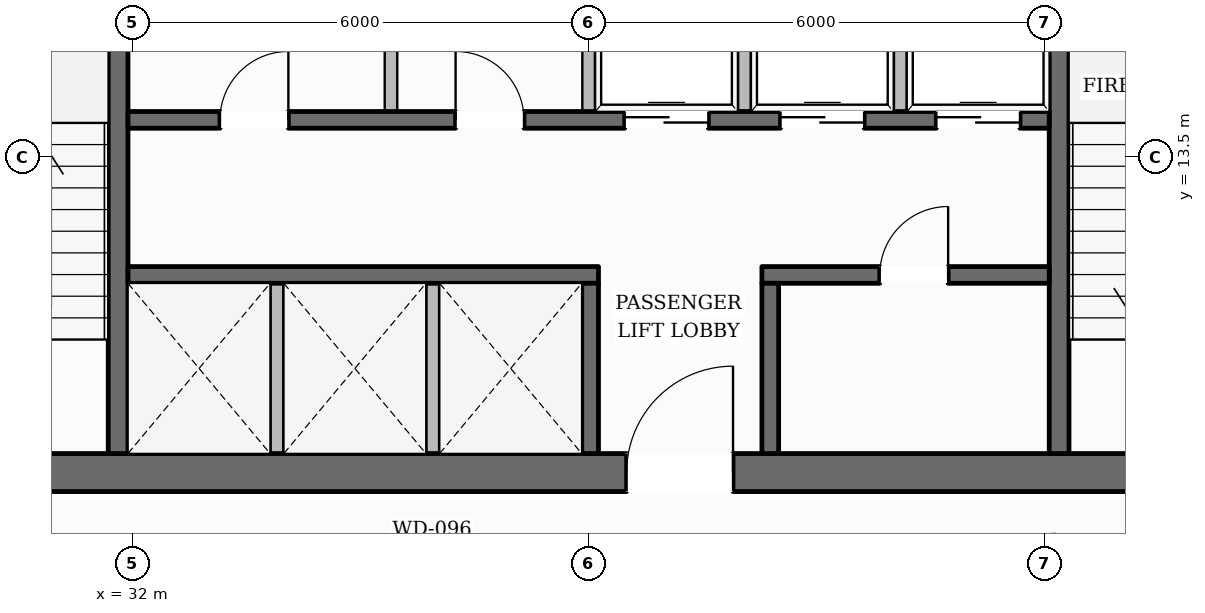
"""IFC4 building model, lengths in metres.
Left out: names, types, materials, properties, quantities, classifications, styles, units other than length and angle.
Written with IfcOpenShell. Run it as: python <this file> out.ifc"""

import sys

from ifc_helpers import new_model, si_unit, direction, frame, frame_2d, origin, place, context, subcontext, project, spatial, rectangle, extrude, element, fill, save


model = new_model("IFC4")
c1 = context("Model", 3, precision=1e-05, world=origin(), true_north=direction((0.0, 1.0)))
c2 = subcontext(c1, "Body", "Model", "MODEL_VIEW")
j1 = project(units=[si_unit("LENGTHUNIT", "METRE"), si_unit("PLANEANGLEUNIT", "RADIAN")], contexts=[c1])
p1 = place(None, origin())
s1 = spatial("IfcSite", under=j1, at=p1, CompositionType="ELEMENT")
p2 = place(p1, origin())
s2 = spatial("IfcBuilding", under=s1, at=p2, CompositionType="ELEMENT")
p3 = place(p2, frame((0.0, 0.0, 100.9)))
s3 = spatial("IfcBuildingStorey", under=s2, at=p3, CompositionType="ELEMENT", Elevation=100.9)
p4 = place(p3, frame((27.98, 9.35, 0.0), z_axis=(0.0, 0.0, 1.0), x_axis=(1.0, 0.0, 0.0)))
e1 = element("IfcWall", 1, at=p4, inside=s3, PredefinedType="SOLIDWALL", context=c2, shape_type="SweptSolid", body=[
    extrude(rectangle(XDim=20.04, YDim=0.5, at=frame_2d((10.02, 0.0))), origin(), (0.0, 0.0, 1.0), 3.6),
])
p5 = place(p4, frame((10.52, 0.0, 0.0)))
e2 = element("IfcOpeningElement", 2, at=p5, cuts=e1, PredefinedType="OPENING", context=c2, shape_type="SweptSolid", body=[
    extrude(rectangle(XDim=1.4, YDim=2.2, at=frame_2d((0.7, 1.1))), frame((0.0, 0.26, 0.0), z_axis=(0.0, -1.0, 0.0), x_axis=(1.0, 0.0, 0.0)), (0.0, 0.0, 1.0), 0.52),
])
p6 = place(p3, frame((31.81, 9.6, 0.0), z_axis=(0.0, 0.0, 1.0), x_axis=(0.0, 1.0, 0.0)))
e3 = element("IfcWall", 3, at=p6, inside=s3, PredefinedType="SHEAR", context=c2, shape_type="SweptSolid", body=[
    extrude(rectangle(XDim=13.0, YDim=0.26, at=frame_2d((6.5, 0.0))), origin(), (0.0, 0.0, 1.0), 3.6),
])
p7 = place(p6, frame((10.925, 0.0, 0.0)))
e4 = element("IfcOpeningElement", 4, at=p7, cuts=e3, PredefinedType="OPENING", context=c2, shape_type="SweptSolid", body=[
    extrude(rectangle(XDim=1.25, YDim=2.25, at=frame_2d((0.625, 1.125))), frame((0.0, 0.14, 0.0), z_axis=(0.0, -1.0, 0.0), x_axis=(1.0, 0.0, 0.0)), (0.0, 0.0, 1.0), 0.28),
])
p8 = place(p3, frame((44.19, 9.6, 0.0), z_axis=(0.0, 0.0, 1.0), x_axis=(0.0, 1.0, 0.0)))
e5 = element("IfcWall", 5, at=p8, inside=s3, PredefinedType="SHEAR", context=c2, shape_type="SweptSolid", body=[
    extrude(rectangle(XDim=13.0, YDim=0.26, at=frame_2d((6.5, 0.0))), origin(), (0.0, 0.0, 1.0), 3.6),
])
p9 = place(p8, frame((10.925, 0.0, 0.0)))
e6 = element("IfcOpeningElement", 6, at=p9, cuts=e5, PredefinedType="OPENING", context=c2, shape_type="SweptSolid", body=[
    extrude(rectangle(XDim=1.25, YDim=2.25, at=frame_2d((0.625, 1.125))), frame((0.0, 0.14, 0.0), z_axis=(0.0, -1.0, 0.0), x_axis=(1.0, 0.0, 0.0)), (0.0, 0.0, 1.0), 0.28),
])
p10 = place(p3, frame((31.94, 13.99, 0.0), z_axis=(0.0, 0.0, 1.0), x_axis=(1.0, 0.0, 0.0)))
e7 = element("IfcWall", 7, at=p10, inside=s3, PredefinedType="SOLIDWALL", context=c2, shape_type="SweptSolid", body=[
    extrude(rectangle(XDim=12.12, YDim=0.22, at=frame_2d((6.06, 0.0))), origin(), (0.0, 0.0, 1.0), 3.6),
])
p11 = place(p10, frame((1.21, 0.0, 0.0)))
e8 = element("IfcOpeningElement", 8, at=p11, cuts=e7, PredefinedType="OPENING", context=c2, shape_type="SweptSolid", body=[
    extrude(rectangle(XDim=0.9, YDim=2.1, at=frame_2d((0.45, 1.05))), frame((0.0, 0.12, 0.0), z_axis=(0.0, -1.0, 0.0), x_axis=(1.0, 0.0, 0.0)), (0.0, 0.0, 1.0), 0.24),
])
p12 = place(p10, frame((4.31, 0.0, 0.0)))
e9 = element("IfcOpeningElement", 9, at=p12, cuts=e7, PredefinedType="OPENING", context=c2, shape_type="SweptSolid", body=[
    extrude(rectangle(XDim=0.9, YDim=2.1, at=frame_2d((0.45, 1.05))), frame((0.0, 0.12, 0.0), z_axis=(0.0, -1.0, 0.0), x_axis=(1.0, 0.0, 0.0)), (0.0, 0.0, 1.0), 0.24),
])
p13 = place(p10, frame((6.535, 0.0, 0.0)))
e10 = element("IfcOpeningElement", 10, at=p13, cuts=e7, PredefinedType="OPENING", context=c2, shape_type="SweptSolid", body=[
    extrude(rectangle(XDim=1.1, YDim=2.2, at=frame_2d((0.55, 1.1))), frame((0.0, 0.12, 0.0), z_axis=(0.0, -1.0, 0.0), x_axis=(1.0, 0.0, 0.0)), (0.0, 0.0, 1.0), 0.24),
])
p14 = place(p10, frame((8.585, 0.0, 0.0)))
e11 = element("IfcOpeningElement", 11, at=p14, cuts=e7, PredefinedType="OPENING", context=c2, shape_type="SweptSolid", body=[
    extrude(rectangle(XDim=1.1, YDim=2.2, at=frame_2d((0.55, 1.1))), frame((0.0, 0.12, 0.0), z_axis=(0.0, -1.0, 0.0), x_axis=(1.0, 0.0, 0.0)), (0.0, 0.0, 1.0), 0.24),
])
p15 = place(p10, frame((10.635, 0.0, 0.0)))
e12 = element("IfcOpeningElement", 12, at=p15, cuts=e7, PredefinedType="OPENING", context=c2, shape_type="SweptSolid", body=[
    extrude(rectangle(XDim=1.1, YDim=2.2, at=frame_2d((0.55, 1.1))), frame((0.0, 0.12, 0.0), z_axis=(0.0, -1.0, 0.0), x_axis=(1.0, 0.0, 0.0)), (0.0, 0.0, 1.0), 0.24),
])
p16 = place(p3, frame((31.94, 11.95, 0.0), z_axis=(0.0, 0.0, 1.0), x_axis=(1.0, 0.0, 0.0)))
e13 = element("IfcWall", 13, at=p16, inside=s3, PredefinedType="SOLIDWALL", context=c2, shape_type="SweptSolid", body=[
    extrude(rectangle(XDim=6.19, YDim=0.22, at=frame_2d((3.095, 0.0))), origin(), (0.0, 0.0, 1.0), 3.6),
])
p17 = place(p3, frame((40.28, 11.95, 0.0), z_axis=(0.0, 0.0, 1.0), x_axis=(1.0, 0.0, 0.0)))
e14 = element("IfcWall", 14, at=p17, inside=s3, PredefinedType="SOLIDWALL", context=c2, shape_type="SweptSolid", body=[
    extrude(rectangle(XDim=3.78, YDim=0.22, at=frame_2d((1.89, 0.0))), origin(), (0.0, 0.0, 1.0), 3.6),
])
p18 = place(p17, frame((1.55, 0.0, 0.0)))
e15 = element("IfcOpeningElement", 15, at=p18, cuts=e14, PredefinedType="OPENING", context=c2, shape_type="SweptSolid", body=[
    extrude(rectangle(XDim=0.9, YDim=2.1, at=frame_2d((0.45, 1.05))), frame((0.0, 0.12, 0.0), z_axis=(0.0, -1.0, 0.0), x_axis=(1.0, 0.0, 0.0)), (0.0, 0.0, 1.0), 0.24),
])
for number, where, z_axis, x_axis in (
    (16, (38.02, 9.6, 0.0), (0.0, 0.0, 1.0), (0.0, 1.0, 0.0)),
    (17, (40.39, 9.6, 0.0), (0.0, 0.0, 1.0), (0.0, 1.0, 0.0)),
):
    element("IfcWall", number, at=place(p3, frame(where, z_axis=z_axis, x_axis=x_axis)), inside=s3, PredefinedType="SOLIDWALL", context=c2, shape_type="SweptSolid", body=[
        extrude(rectangle(XDim=2.24, YDim=0.22, at=frame_2d((1.12, 0.0))), origin(), (0.0, 0.0, 1.0), 3.6),
    ])
p19 = place(p3, frame((14.155, 13.347, 0.0), z_axis=(0.0, 0.0, 1.0), x_axis=(0.493868426836, 0.869536644986, 0.0)))
e18 = element("IfcWall", 18, at=p19, inside=s3, PredefinedType="STANDARD", context=c2, shape_type="SweptSolid", body=[
    extrude(rectangle(XDim=36.121, YDim=0.38, at=frame_2d((18.061, 0.0))), origin(), (0.0, 0.0, 1.0), 3.059),
])
p20 = place(p19, frame((31.935, 0.0, 0.65)))
e19 = element("IfcOpeningElement", 19, at=p20, cuts=e18, PredefinedType="OPENING", context=c2, shape_type="SweptSolid", body=[
    extrude(rectangle(XDim=1.55, YDim=1.75, at=frame_2d((0.775, 0.875))), frame((0.0, 0.2, 0.0), z_axis=(0.0, -1.0, 0.0), x_axis=(1.0, 0.0, 0.0)), (0.0, 0.0, 1.0), 0.4),
])
p21 = place(p19, frame((26.073, 0.0, 0.65)))
e20 = element("IfcOpeningElement", 20, at=p21, cuts=e18, PredefinedType="OPENING", context=c2, shape_type="SweptSolid", body=[
    extrude(rectangle(XDim=1.55, YDim=1.75, at=frame_2d((0.775, 0.875))), frame((0.0, 0.2, 0.0), z_axis=(0.0, -1.0, 0.0), x_axis=(1.0, 0.0, 0.0)), (0.0, 0.0, 1.0), 0.4),
])
p22 = place(p19, frame((14.352, 0.0, 0.65)))
e21 = element("IfcOpeningElement", 21, at=p22, cuts=e18, PredefinedType="OPENING", context=c2, shape_type="SweptSolid", body=[
    extrude(rectangle(XDim=1.55, YDim=1.75, at=frame_2d((0.775, 0.875))), frame((0.0, 0.2, 0.0), z_axis=(0.0, -1.0, 0.0), x_axis=(1.0, 0.0, 0.0)), (0.0, 0.0, 1.0), 0.4),
])
p23 = place(p19, frame((8.491, 0.0, 0.65)))
e22 = element("IfcOpeningElement", 22, at=p23, cuts=e18, PredefinedType="OPENING", context=c2, shape_type="SweptSolid", body=[
    extrude(rectangle(XDim=1.55, YDim=1.75, at=frame_2d((0.775, 0.875))), frame((0.0, 0.2, 0.0), z_axis=(0.0, -1.0, 0.0), x_axis=(1.0, 0.0, 0.0)), (0.0, 0.0, 1.0), 0.4),
])
p24 = place(p19, frame((2.63, 0.0, 0.65)))
e23 = element("IfcOpeningElement", 23, at=p24, cuts=e18, PredefinedType="OPENING", context=c2, shape_type="SweptSolid", body=[
    extrude(rectangle(XDim=1.55, YDim=1.75, at=frame_2d((0.775, 0.875))), frame((0.0, 0.2, 0.0), z_axis=(0.0, -1.0, 0.0), x_axis=(1.0, 0.0, 0.0)), (0.0, 0.0, 1.0), 0.4),
])
p25 = place(p3, frame((44.12, 44.689, 0.0), z_axis=(0.0, 0.0, 1.0), x_axis=(0.498376840975, -0.866960509124, 0.0)))
e24 = element("IfcWall", 24, at=p25, inside=s3, PredefinedType="STANDARD", context=c2, shape_type="SweptSolid", body=[
    extrude(rectangle(XDim=36.441, YDim=0.38, at=frame_2d((18.22, 0.0))), origin(), (0.0, 0.0, 1.0), 3.059),
])
p26 = place(p25, frame((32.234, 0.0, 0.65)))
e25 = element("IfcOpeningElement", 25, at=p26, cuts=e24, PredefinedType="OPENING", context=c2, shape_type="SweptSolid", body=[
    extrude(rectangle(XDim=1.55, YDim=1.75, at=frame_2d((0.775, 0.875))), frame((0.0, 0.2, 0.0), z_axis=(0.0, -1.0, 0.0), x_axis=(1.0, 0.0, 0.0)), (0.0, 0.0, 1.0), 0.4),
])
p27 = place(p25, frame((26.319, 0.0, 0.65)))
e26 = element("IfcOpeningElement", 26, at=p27, cuts=e24, PredefinedType="OPENING", context=c2, shape_type="SweptSolid", body=[
    extrude(rectangle(XDim=1.55, YDim=1.75, at=frame_2d((0.775, 0.875))), frame((0.0, 0.2, 0.0), z_axis=(0.0, -1.0, 0.0), x_axis=(1.0, 0.0, 0.0)), (0.0, 0.0, 1.0), 0.4),
])
p28 = place(p25, frame((14.489, 0.0, 0.65)))
e27 = element("IfcOpeningElement", 27, at=p28, cuts=e24, PredefinedType="OPENING", context=c2, shape_type="SweptSolid", body=[
    extrude(rectangle(XDim=1.55, YDim=1.75, at=frame_2d((0.775, 0.875))), frame((0.0, 0.2, 0.0), z_axis=(0.0, -1.0, 0.0), x_axis=(1.0, 0.0, 0.0)), (0.0, 0.0, 1.0), 0.4),
])
p29 = place(p25, frame((8.573, 0.0, 0.65)))
e28 = element("IfcOpeningElement", 28, at=p29, cuts=e24, PredefinedType="OPENING", context=c2, shape_type="SweptSolid", body=[
    extrude(rectangle(XDim=1.55, YDim=1.75, at=frame_2d((0.775, 0.875))), frame((0.0, 0.2, 0.0), z_axis=(0.0, -1.0, 0.0), x_axis=(1.0, 0.0, 0.0)), (0.0, 0.0, 1.0), 0.4),
])
p30 = place(p25, frame((2.658, 0.0, 0.65)))
e29 = element("IfcOpeningElement", 29, at=p30, cuts=e24, PredefinedType="OPENING", context=c2, shape_type="SweptSolid", body=[
    extrude(rectangle(XDim=1.55, YDim=1.75, at=frame_2d((0.775, 0.875))), frame((0.0, 0.2, 0.0), z_axis=(0.0, -1.0, 0.0), x_axis=(1.0, 0.0, 0.0)), (0.0, 0.0, 1.0), 0.4),
])
for number, where, z_axis, x_axis in (
    (30, (33.9, 9.55, 0.0), (0.0, 0.0, 1.0), (0.0, 1.0, 0.0)),
    (31, (35.95, 9.55, 0.0), (0.0, 0.0, 1.0), (0.0, 1.0, 0.0)),
):
    element("IfcWall", number, at=place(p3, frame(where, z_axis=z_axis, x_axis=x_axis)), inside=s3, PredefinedType="PARTITIONING", context=c2, shape_type="SweptSolid", body=[
        extrude(rectangle(XDim=2.29, YDim=0.165, at=frame_2d((1.145, 0.0))), origin(), (0.0, 0.0, 1.0), 3.6),
    ])
for number, where, z_axis, x_axis in (
    (32, (38.0, 14.1, 0.0), (0.0, 0.0, 1.0), (0.0, 1.0, 0.0)),
    (33, (35.4, 14.1, 0.0), (0.0, 0.0, 1.0), (0.0, 1.0, 0.0)),
    (34, (40.05, 14.1, 0.0), (0.0, 0.0, 1.0), (0.0, 1.0, 0.0)),
    (35, (42.1, 14.1, 0.0), (0.0, 0.0, 1.0), (0.0, 1.0, 0.0)),
):
    element("IfcWall", number, at=place(p3, frame(where, z_axis=z_axis, x_axis=x_axis)), inside=s3, PredefinedType="PARTITIONING", context=c2, shape_type="SweptSolid", body=[
        extrude(rectangle(XDim=2.24, YDim=0.165, at=frame_2d((1.12, 0.0))), origin(), (0.0, 0.0, 1.0), 3.6),
    ])
p31 = place(p5, origin())
e36 = element("IfcDoor", 36, at=p31, inside=s3, OperationType="SINGLE_SWING_RIGHT", PredefinedType="DOOR", context=c2, shape_type="SweptSolid", body=[
    extrude(rectangle(XDim=1.4, YDim=2.2, at=frame_2d((0.7, 1.1))), frame((0.0, 0.025, 0.0), z_axis=(0.0, -1.0, 0.0), x_axis=(1.0, 0.0, 0.0)), (0.0, 0.0, 1.0), 0.05),
])
fill(e2, e36)
p32 = place(p11, origin())
e37 = element("IfcDoor", 37, at=p32, inside=s3, OperationType="SINGLE_SWING_RIGHT", PredefinedType="DOOR", context=c2, shape_type="SweptSolid", body=[
    extrude(rectangle(XDim=0.9, YDim=2.1, at=frame_2d((0.45, 1.05))), frame((0.0, 0.025, 0.0), z_axis=(0.0, -1.0, 0.0), x_axis=(1.0, 0.0, 0.0)), (0.0, 0.0, 1.0), 0.05),
])
fill(e8, e37)
p33 = place(p12, origin())
e38 = element("IfcDoor", 38, at=p33, inside=s3, OperationType="SINGLE_SWING_LEFT", PredefinedType="DOOR", context=c2, shape_type="SweptSolid", body=[
    extrude(rectangle(XDim=0.9, YDim=2.1, at=frame_2d((0.45, 1.05))), frame((0.0, 0.025, 0.0), z_axis=(0.0, -1.0, 0.0), x_axis=(1.0, 0.0, 0.0)), (0.0, 0.0, 1.0), 0.05),
])
fill(e9, e38)
p34 = place(p13, origin())
e39 = element("IfcDoor", 39, at=p34, inside=s3, OperationType="DOUBLE_DOOR_SLIDING", PredefinedType="DOOR", context=c2, shape_type="SweptSolid", body=[
    extrude(rectangle(XDim=1.1, YDim=2.2, at=frame_2d((0.55, 1.1))), frame((0.0, 0.025, 0.0), z_axis=(0.0, -1.0, 0.0), x_axis=(1.0, 0.0, 0.0)), (0.0, 0.0, 1.0), 0.05),
])
fill(e10, e39)
p35 = place(p14, origin())
e40 = element("IfcDoor", 40, at=p35, inside=s3, OperationType="DOUBLE_DOOR_SLIDING", PredefinedType="DOOR", context=c2, shape_type="SweptSolid", body=[
    extrude(rectangle(XDim=1.1, YDim=2.2, at=frame_2d((0.55, 1.1))), frame((0.0, 0.025, 0.0), z_axis=(0.0, -1.0, 0.0), x_axis=(1.0, 0.0, 0.0)), (0.0, 0.0, 1.0), 0.05),
])
fill(e11, e40)
p36 = place(p15, origin())
e41 = element("IfcDoor", 41, at=p36, inside=s3, OperationType="DOUBLE_DOOR_SLIDING", PredefinedType="DOOR", context=c2, shape_type="SweptSolid", body=[
    extrude(rectangle(XDim=1.1, YDim=2.2, at=frame_2d((0.55, 1.1))), frame((0.0, 0.025, 0.0), z_axis=(0.0, -1.0, 0.0), x_axis=(1.0, 0.0, 0.0)), (0.0, 0.0, 1.0), 0.05),
])
fill(e12, e41)
p37 = place(p18, origin())
e42 = element("IfcDoor", 42, at=p37, inside=s3, OperationType="SINGLE_SWING_RIGHT", PredefinedType="DOOR", context=c2, shape_type="SweptSolid", body=[
    extrude(rectangle(XDim=0.9, YDim=2.1, at=frame_2d((0.45, 1.05))), frame((0.0, 0.025, 0.0), z_axis=(0.0, -1.0, 0.0), x_axis=(1.0, 0.0, 0.0)), (0.0, 0.0, 1.0), 0.05),
])
fill(e15, e42)
save(model, sys.argv[1])
